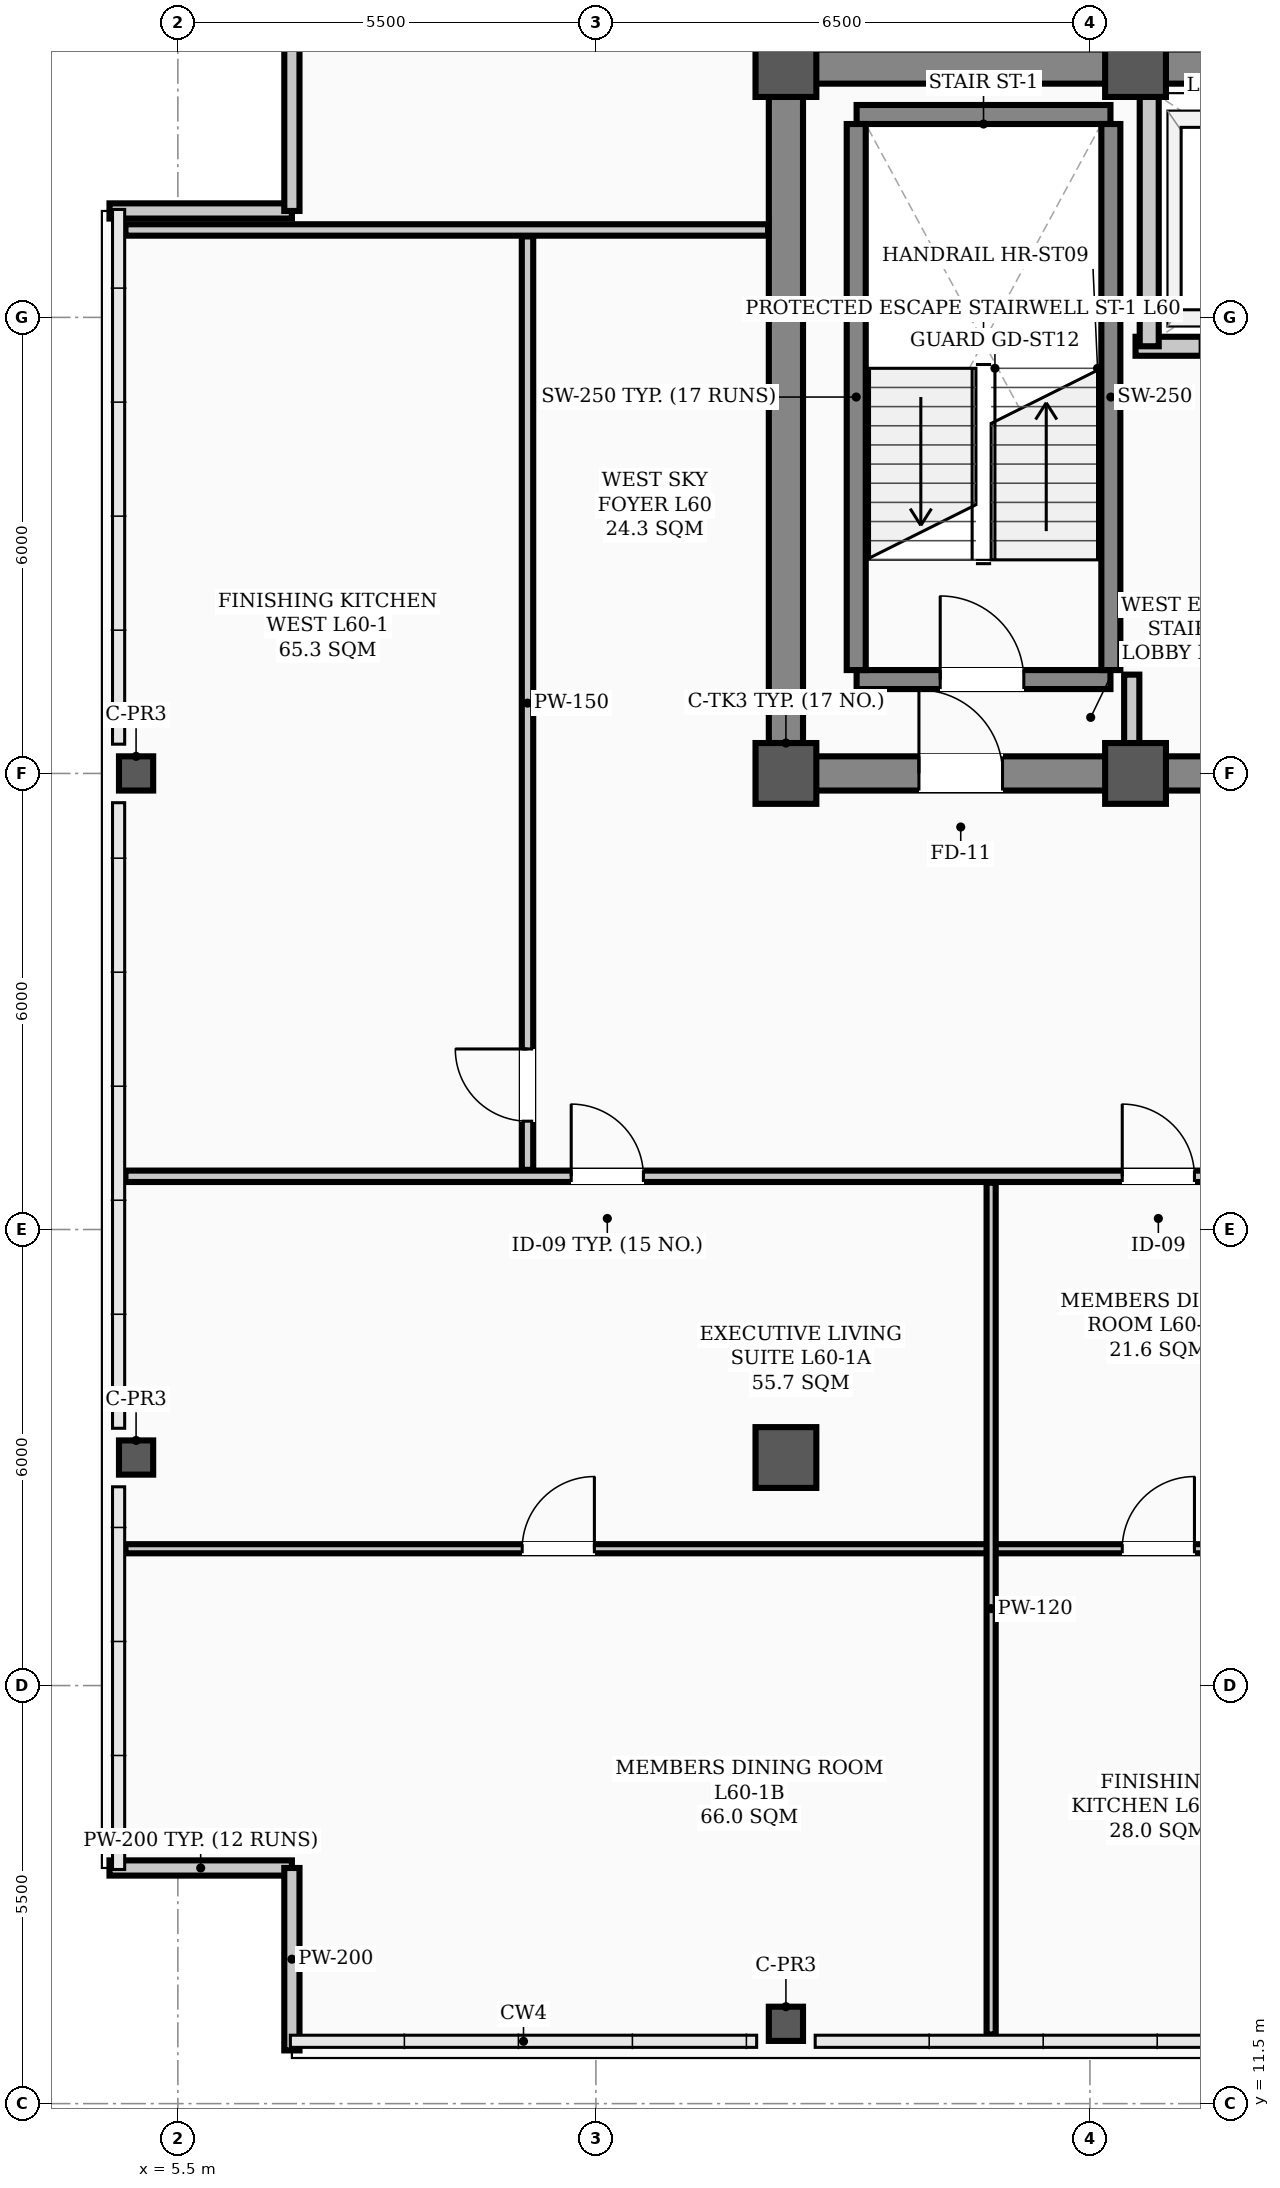
"""IFC4 building model, lengths in metres.
Left out: names, types, materials, properties, quantities, classifications, styles, units other than length and angle.
Written with IfcOpenShell. Run it as: python <this file> out.ifc"""

import sys

from ifc_helpers import new_model, si_unit, direction, frame, frame_2d, origin, origin_2d, place, context, subcontext, project, spatial, rectangle, hollow_rectangle, extrude, element, fill, save


model = new_model("IFC4")
c1 = context("Model", 3, precision=1e-05, world=origin(), true_north=direction((0.0, 1.0)))
c2 = subcontext(c1, "Body", "Model", "MODEL_VIEW")
j1 = project(units=[si_unit("LENGTHUNIT", "METRE"), si_unit("PLANEANGLEUNIT", "RADIAN")], contexts=[c1])
p1 = place(None, origin())
s1 = spatial("IfcSite", under=j1, at=p1, CompositionType="ELEMENT")
p2 = place(p1, origin())
s2 = spatial("IfcBuilding", under=s1, at=p2, CompositionType="ELEMENT")
p3 = place(p2, frame((0.0, 0.0, 242.3)))
s3 = spatial("IfcBuildingStorey", under=s2, at=p3, CompositionType="ELEMENT", Elevation=242.3)
for number, where, z_axis, x_axis in (
    (1, (13.5, 29.0, 0.0), (0.0, 0.0, 1.0), (1.0, 0.0, 0.0)),
    (2, (13.5, 38.3, 0.0), (0.0, 0.0, 1.0), (1.0, 0.0, 0.0)),
    (3, (18.1, 29.0, 0.0), (0.0, 0.0, 1.0), (1.0, 0.0, 0.0)),
    (4, (18.1, 38.3, 0.0), (0.0, 0.0, 1.0), (1.0, 0.0, 0.0)),
    (5, (13.5, 20.0, 0.0), (0.0, 0.0, 1.0), (1.0, 0.0, 0.0)),
):
    element("IfcColumn", number, at=place(p3, frame(where, z_axis=z_axis, x_axis=x_axis)), inside=s3, PredefinedType="COLUMN", context=c2, shape_type="SweptSolid", body=[
        extrude(hollow_rectangle(XDim=0.8, YDim=0.8, WallThickness=0.032, InnerFilletRadius=0.016, OuterFilletRadius=0.048, at=origin_2d()), origin(), (0.0, 0.0, 1.0), 3.9),
    ])
for number, where, z_axis, x_axis in (
    (6, (4.95, 20.0, 0.0), (0.0, 0.0, 1.0), (1.0, 0.0, 0.0)),
    (7, (4.95, 29.0, 0.0), (0.0, 0.0, 1.0), (1.0, 0.0, 0.0)),
    (8, (13.5, 12.55, 0.0), (0.0, 0.0, 1.0), (1.0, 0.0, 0.0)),
):
    element("IfcColumn", number, at=place(p3, frame(where, z_axis=z_axis, x_axis=x_axis)), inside=s3, PredefinedType="COLUMN", context=c2, shape_type="SweptSolid", body=[
        extrude(hollow_rectangle(XDim=0.45, YDim=0.45, WallThickness=0.022, InnerFilletRadius=0.022, OuterFilletRadius=0.044, at=origin_2d()), origin(), (0.0, 0.0, 1.0), 3.9),
    ])
p4 = place(p3, frame((4.6, 14.6, 0.0), z_axis=(0.0, 0.0, 1.0), x_axis=(1.0, 0.0, 0.0)))
e9 = element("IfcWall", 9, at=p4, inside=s3, PredefinedType="PARAPET", context=c2, shape_type="SweptSolid", body=[
    extrude(rectangle(XDim=2.4, YDim=0.2, at=frame_2d((1.2, 0.0))), origin(), (0.0, 0.0, 1.0), 1.2),
])
p5 = place(p3, frame((7.0, 14.6, 0.0), z_axis=(0.0, 0.0, 1.0), x_axis=(0.0, -1.0, 0.0)))
e10 = element("IfcWall", 10, at=p5, inside=s3, PredefinedType="PARAPET", context=c2, shape_type="SweptSolid", body=[
    extrude(rectangle(XDim=2.4, YDim=0.2, at=frame_2d((1.2, 0.0))), origin(), (0.0, 0.0, 1.0), 1.2),
])
p6 = place(p3, frame((4.6, 36.4, 0.0), z_axis=(0.0, 0.0, 1.0), x_axis=(1.0, 0.0, 0.0)))
e11 = element("IfcWall", 11, at=p6, inside=s3, PredefinedType="PARAPET", context=c2, shape_type="SweptSolid", body=[
    extrude(rectangle(XDim=2.4, YDim=0.2, at=frame_2d((1.2, 0.0))), origin(), (0.0, 0.0, 1.0), 1.2),
])
p7 = place(p3, frame((7.0, 36.4, 0.0), z_axis=(0.0, 0.0, 1.0), x_axis=(0.0, 1.0, 0.0)))
e12 = element("IfcWall", 12, at=p7, inside=s3, PredefinedType="PARAPET", context=c2, shape_type="SweptSolid", body=[
    extrude(rectangle(XDim=2.4, YDim=0.2, at=frame_2d((1.2, 0.0))), origin(), (0.0, 0.0, 1.0), 1.2),
])
p8 = place(p3, frame((13.5, 29.0, 0.0), z_axis=(0.0, 0.0, 1.0), x_axis=(1.0, 0.0, 0.0)))
e13 = element("IfcWall", 13, at=p8, inside=s3, PredefinedType="SHEAR", context=c2, shape_type="SweptSolid", body=[
    extrude(rectangle(XDim=30.5, YDim=0.45, at=frame_2d((15.25, 0.0))), origin(), (0.0, 0.0, 1.0), 3.72),
])
p9 = place(p8, frame((1.75, 0.0, 0.0)))
e14 = element("IfcOpeningElement", 14, at=p9, cuts=e13, PredefinedType="OPENING", context=c2, shape_type="SweptSolid", body=[
    extrude(rectangle(XDim=1.1, YDim=2.08, at=frame_2d((0.55, 1.04))), frame((0.0, 0.235, 0.0), z_axis=(0.0, -1.0, 0.0), x_axis=(1.0, 0.0, 0.0)), (0.0, 0.0, 1.0), 0.47),
])
p10 = place(p8, frame((26.7, 0.0, 0.0)))
e15 = element("IfcOpeningElement", 15, at=p10, cuts=e13, PredefinedType="OPENING", context=c2, shape_type="SweptSolid", body=[
    extrude(rectangle(XDim=1.1, YDim=2.08, at=frame_2d((0.55, 1.04))), frame((0.0, 0.235, 0.0), z_axis=(0.0, -1.0, 0.0), x_axis=(1.0, 0.0, 0.0)), (0.0, 0.0, 1.0), 0.47),
])
p11 = place(p8, frame((6.8, 0.0, 0.0)))
e16 = element("IfcOpeningElement", 16, at=p11, cuts=e13, PredefinedType="OPENING", context=c2, shape_type="SweptSolid", body=[
    extrude(rectangle(XDim=1.1, YDim=2.08, at=frame_2d((0.55, 1.04))), frame((0.0, 0.235, 0.0), z_axis=(0.0, -1.0, 0.0), x_axis=(1.0, 0.0, 0.0)), (0.0, 0.0, 1.0), 0.47),
])
p12 = place(p8, frame((13.2, 0.0, 0.0)))
e17 = element("IfcOpeningElement", 17, at=p12, cuts=e13, PredefinedType="OPENING", context=c2, shape_type="SweptSolid", body=[
    extrude(rectangle(XDim=1.6, YDim=2.08, at=frame_2d((0.8, 1.04))), frame((0.0, 0.235, 0.0), z_axis=(0.0, -1.0, 0.0), x_axis=(1.0, 0.0, 0.0)), (0.0, 0.0, 1.0), 0.47),
])
p13 = place(p8, frame((19.53, 0.0, 0.0)))
e18 = element("IfcOpeningElement", 18, at=p13, cuts=e13, PredefinedType="OPENING", context=c2, shape_type="SweptSolid", body=[
    extrude(rectangle(XDim=0.9, YDim=2.08, at=frame_2d((0.45, 1.04))), frame((0.0, 0.235, 0.0), z_axis=(0.0, -1.0, 0.0), x_axis=(1.0, 0.0, 0.0)), (0.0, 0.0, 1.0), 0.47),
])
p14 = place(p8, frame((21.57, 0.0, 0.0)))
e19 = element("IfcOpeningElement", 19, at=p14, cuts=e13, PredefinedType="OPENING", context=c2, shape_type="SweptSolid", body=[
    extrude(rectangle(XDim=0.9, YDim=2.08, at=frame_2d((0.45, 1.04))), frame((0.0, 0.235, 0.0), z_axis=(0.0, -1.0, 0.0), x_axis=(1.0, 0.0, 0.0)), (0.0, 0.0, 1.0), 0.47),
])
p15 = place(p3, frame((13.5, 38.3, 0.0), z_axis=(0.0, 0.0, 1.0), x_axis=(1.0, 0.0, 0.0)))
e20 = element("IfcWall", 20, at=p15, inside=s3, PredefinedType="SHEAR", context=c2, shape_type="SweptSolid", body=[
    extrude(rectangle(XDim=30.5, YDim=0.45, at=frame_2d((15.25, 0.0))), origin(), (0.0, 0.0, 1.0), 3.72),
])
p16 = place(p3, frame((13.5, 29.35, 0.0), z_axis=(0.0, 0.0, 1.0), x_axis=(0.0, 1.0, 0.0)))
e21 = element("IfcWall", 21, at=p16, inside=s3, PredefinedType="SHEAR", context=c2, shape_type="SweptSolid", body=[
    extrude(rectangle(XDim=8.6, YDim=0.45, at=frame_2d((4.3, 0.0))), origin(), (0.0, 0.0, 1.0), 3.72),
])
p17 = place(p3, frame((14.43, 30.235, 0.0), z_axis=(0.0, 0.0, 1.0), x_axis=(1.0, 0.0, 0.0)))
e22 = element("IfcWall", 22, at=p17, inside=s3, PredefinedType="STANDARD", context=c2, shape_type="SweptSolid", body=[
    extrude(rectangle(XDim=3.34, YDim=0.25, at=frame_2d((1.67, 0.0))), origin(), (0.0, 0.0, 1.0), 3.72),
])
p18 = place(p17, frame((1.1, 0.0, 0.0)))
e23 = element("IfcOpeningElement", 23, at=p18, cuts=e22, PredefinedType="OPENING", context=c2, shape_type="SweptSolid", body=[
    extrude(rectangle(XDim=1.1, YDim=2.08, at=frame_2d((0.55, 1.04))), frame((0.0, 0.135, 0.0), z_axis=(0.0, -1.0, 0.0), x_axis=(1.0, 0.0, 0.0)), (0.0, 0.0, 1.0), 0.27),
])
p19 = place(p3, frame((14.43, 37.669, 0.0), z_axis=(0.0, 0.0, 1.0), x_axis=(1.0, 0.0, 0.0)))
e24 = element("IfcWall", 24, at=p19, inside=s3, PredefinedType="STANDARD", context=c2, shape_type="SweptSolid", body=[
    extrude(rectangle(XDim=3.34, YDim=0.25, at=frame_2d((1.67, 0.0))), origin(), (0.0, 0.0, 1.0), 3.72),
])
for number, where, z_axis, x_axis in (
    (25, (14.425, 30.36, 0.0), (0.0, 0.0, 1.0), (0.0, 1.0, 0.0)),
    (26, (17.775, 30.36, 0.0), (0.0, 0.0, 1.0), (0.0, 1.0, 0.0)),
):
    element("IfcWall", number, at=place(p3, frame(where, z_axis=z_axis, x_axis=x_axis)), inside=s3, PredefinedType="STANDARD", context=c2, shape_type="SweptSolid", body=[
        extrude(rectangle(XDim=7.184, YDim=0.25, at=frame_2d((3.592, 0.0))), origin(), (0.0, 0.0, 1.0), 3.72),
    ])
p20 = place(p3, frame((18.1, 34.62, 0.0), z_axis=(0.0, 0.0, 1.0), x_axis=(1.0, 0.0, 0.0)))
e27 = element("IfcWall", 27, at=p20, inside=s3, PredefinedType="STANDARD", context=c2, shape_type="SweptSolid", body=[
    extrude(rectangle(XDim=5.35, YDim=0.25, at=frame_2d((2.675, 0.0))), origin(), (0.0, 0.0, 1.0), 3.72),
])
p21 = place(p20, frame((0.85, 0.0, 0.0)))
e28 = element("IfcOpeningElement", 28, at=p21, cuts=e27, PredefinedType="OPENING", context=c2, shape_type="SweptSolid", body=[
    extrude(rectangle(XDim=1.1, YDim=2.08, at=frame_2d((0.55, 1.04))), frame((0.0, 0.135, 0.0), z_axis=(0.0, -1.0, 0.0), x_axis=(1.0, 0.0, 0.0)), (0.0, 0.0, 1.0), 0.27),
])
p22 = place(p20, frame((3.45, 0.0, 0.0)))
e29 = element("IfcOpeningElement", 29, at=p22, cuts=e27, PredefinedType="OPENING", context=c2, shape_type="SweptSolid", body=[
    extrude(rectangle(XDim=1.1, YDim=2.08, at=frame_2d((0.55, 1.04))), frame((0.0, 0.135, 0.0), z_axis=(0.0, -1.0, 0.0), x_axis=(1.0, 0.0, 0.0)), (0.0, 0.0, 1.0), 0.27),
])
p23 = place(p3, frame((18.28, 34.62, 0.0), z_axis=(0.0, 0.0, 1.0), x_axis=(0.0, 1.0, 0.0)))
e30 = element("IfcWall", 30, at=p23, inside=s3, PredefinedType="STANDARD", context=c2, shape_type="SweptSolid", body=[
    extrude(rectangle(XDim=3.33, YDim=0.25, at=frame_2d((1.665, 0.0))), origin(), (0.0, 0.0, 1.0), 3.72),
])
p24 = place(p3, frame((4.81, 23.7, 0.0), z_axis=(0.0, 0.0, 1.0), x_axis=(1.0, 0.0, 0.0)))
e31 = element("IfcWall", 31, at=p24, inside=s3, PredefinedType="PARTITIONING", context=c2, shape_type="SweptSolid", body=[
    extrude(rectangle(XDim=40.88, YDim=0.15, at=frame_2d((20.44, 0.0))), origin(), (0.0, 0.0, 1.0), 3.2),
])
p25 = place(p24, frame((5.865, 0.0, 0.0)))
e32 = element("IfcOpeningElement", 32, at=p25, cuts=e31, PredefinedType="OPENING", context=c2, shape_type="SweptSolid", body=[
    extrude(rectangle(XDim=0.95, YDim=2.08, at=frame_2d((0.475, 1.04))), frame((0.0, 0.085, 0.0), z_axis=(0.0, -1.0, 0.0), x_axis=(1.0, 0.0, 0.0)), (0.0, 0.0, 1.0), 0.17),
])
p26 = place(p24, frame((13.115, 0.0, 0.0)))
e33 = element("IfcOpeningElement", 33, at=p26, cuts=e31, PredefinedType="OPENING", context=c2, shape_type="SweptSolid", body=[
    extrude(rectangle(XDim=0.95, YDim=2.08, at=frame_2d((0.475, 1.04))), frame((0.0, 0.085, 0.0), z_axis=(0.0, -1.0, 0.0), x_axis=(1.0, 0.0, 0.0)), (0.0, 0.0, 1.0), 0.17),
])
p27 = place(p24, frame((16.515, 0.0, 0.0)))
e34 = element("IfcOpeningElement", 34, at=p27, cuts=e31, PredefinedType="OPENING", context=c2, shape_type="SweptSolid", body=[
    extrude(rectangle(XDim=0.95, YDim=2.08, at=frame_2d((0.475, 1.04))), frame((0.0, 0.085, 0.0), z_axis=(0.0, -1.0, 0.0), x_axis=(1.0, 0.0, 0.0)), (0.0, 0.0, 1.0), 0.17),
])
p28 = place(p24, frame((22.915, 0.0, 0.0)))
e35 = element("IfcOpeningElement", 35, at=p28, cuts=e31, PredefinedType="OPENING", context=c2, shape_type="SweptSolid", body=[
    extrude(rectangle(XDim=0.95, YDim=2.08, at=frame_2d((0.475, 1.04))), frame((0.0, 0.085, 0.0), z_axis=(0.0, -1.0, 0.0), x_axis=(1.0, 0.0, 0.0)), (0.0, 0.0, 1.0), 0.17),
])
p29 = place(p24, frame((29.115, 0.0, 0.0)))
e36 = element("IfcOpeningElement", 36, at=p29, cuts=e31, PredefinedType="OPENING", context=c2, shape_type="SweptSolid", body=[
    extrude(rectangle(XDim=0.95, YDim=2.08, at=frame_2d((0.475, 1.04))), frame((0.0, 0.085, 0.0), z_axis=(0.0, -1.0, 0.0), x_axis=(1.0, 0.0, 0.0)), (0.0, 0.0, 1.0), 0.17),
])
p30 = place(p24, frame((34.215, 0.0, 0.0)))
e37 = element("IfcOpeningElement", 37, at=p30, cuts=e31, PredefinedType="OPENING", context=c2, shape_type="SweptSolid", body=[
    extrude(rectangle(XDim=0.95, YDim=2.08, at=frame_2d((0.475, 1.04))), frame((0.0, 0.085, 0.0), z_axis=(0.0, -1.0, 0.0), x_axis=(1.0, 0.0, 0.0)), (0.0, 0.0, 1.0), 0.17),
])
p31 = place(p24, frame((38.46, 0.0, 0.0)))
e38 = element("IfcOpeningElement", 38, at=p31, cuts=e31, PredefinedType="OPENING", context=c2, shape_type="SweptSolid", body=[
    extrude(rectangle(XDim=0.95, YDim=2.08, at=frame_2d((0.475, 1.04))), frame((0.0, 0.085, 0.0), z_axis=(0.0, -1.0, 0.0), x_axis=(1.0, 0.0, 0.0)), (0.0, 0.0, 1.0), 0.17),
])
p32 = place(p3, frame((4.81, 36.15, 0.0), z_axis=(0.0, 0.0, 1.0), x_axis=(1.0, 0.0, 0.0)))
e39 = element("IfcWall", 39, at=p32, inside=s3, PredefinedType="PARTITIONING", context=c2, shape_type="SweptSolid", body=[
    extrude(rectangle(XDim=8.455, YDim=0.15, at=frame_2d((4.228, 0.0))), origin(), (0.0, 0.0, 1.0), 3.2),
])
p33 = place(p3, frame((4.81, 18.8, 0.0), z_axis=(0.0, 0.0, 1.0), x_axis=(1.0, 0.0, 0.0)))
e40 = element("IfcWall", 40, at=p33, inside=s3, PredefinedType="PARTITIONING", context=c2, shape_type="SweptSolid", body=[
    extrude(rectangle(XDim=11.39, YDim=0.12, at=frame_2d((5.695, 0.0))), origin(), (0.0, 0.0, 1.0), 3.2),
])
p34 = place(p33, frame((5.22, 0.0, 0.0)))
e41 = element("IfcOpeningElement", 41, at=p34, cuts=e40, PredefinedType="OPENING", context=c2, shape_type="SweptSolid", body=[
    extrude(rectangle(XDim=0.95, YDim=2.08, at=frame_2d((0.475, 1.04))), frame((0.0, 0.07, 0.0), z_axis=(0.0, -1.0, 0.0), x_axis=(1.0, 0.0, 0.0)), (0.0, 0.0, 1.0), 0.14),
])
p35 = place(p3, frame((16.2, 18.8, 0.0), z_axis=(0.0, 0.0, 1.0), x_axis=(1.0, 0.0, 0.0)))
e42 = element("IfcWall", 42, at=p35, inside=s3, PredefinedType="PARTITIONING", context=c2, shape_type="SweptSolid", body=[
    extrude(rectangle(XDim=4.4, YDim=0.12, at=frame_2d((2.2, 0.0))), origin(), (0.0, 0.0, 1.0), 3.35),
])
p36 = place(p35, frame((1.725, 0.0, 0.0)))
e43 = element("IfcOpeningElement", 43, at=p36, cuts=e42, PredefinedType="OPENING", context=c2, shape_type="SweptSolid", body=[
    extrude(rectangle(XDim=0.95, YDim=2.08, at=frame_2d((0.475, 1.04))), frame((0.0, 0.07, 0.0), z_axis=(0.0, -1.0, 0.0), x_axis=(1.0, 0.0, 0.0)), (0.0, 0.0, 1.0), 0.14),
])
p37 = place(p3, frame((18.05, 29.235, 0.0), z_axis=(0.0, 0.0, 1.0), x_axis=(0.0, 1.0, 0.0)))
e44 = element("IfcWall", 44, at=p37, inside=s3, PredefinedType="STANDARD", context=c2, shape_type="SweptSolid", body=[
    extrude(rectangle(XDim=1.065, YDim=0.2, at=frame_2d((0.532, 0.0))), origin(), (0.0, 0.0, 1.0), 3.35),
])
p38 = place(p3, frame((10.1, 23.785, 0.0), z_axis=(0.0, 0.0, 1.0), x_axis=(0.0, 1.0, 0.0)))
e45 = element("IfcWall", 45, at=p38, inside=s3, PredefinedType="PARTITIONING", context=c2, shape_type="SweptSolid", body=[
    extrude(rectangle(XDim=12.28, YDim=0.15, at=frame_2d((6.14, 0.0))), origin(), (0.0, 0.0, 1.0), 3.1),
])
p39 = place(p38, frame((0.64, 0.0, 0.0)))
e46 = element("IfcOpeningElement", 46, at=p39, cuts=e45, PredefinedType="OPENING", context=c2, shape_type="SweptSolid", body=[
    extrude(rectangle(XDim=0.95, YDim=2.08, at=frame_2d((0.475, 1.04))), frame((0.0, 0.085, 0.0), z_axis=(0.0, -1.0, 0.0), x_axis=(1.0, 0.0, 0.0)), (0.0, 0.0, 1.0), 0.17),
])
p40 = place(p3, frame((16.2, 12.41, 0.0), z_axis=(0.0, 0.0, 1.0), x_axis=(0.0, 1.0, 0.0)))
e47 = element("IfcWall", 47, at=p40, inside=s3, PredefinedType="PARTITIONING", context=c2, shape_type="SweptSolid", body=[
    extrude(rectangle(XDim=11.205, YDim=0.12, at=frame_2d((5.603, 0.0))), origin(), (0.0, 0.0, 1.0), 3.1),
])
p41 = place(p18, origin())
e48 = element("IfcDoor", 48, at=p41, inside=s3, OperationType="SINGLE_SWING_LEFT", PredefinedType="DOOR", context=c2, shape_type="SweptSolid", body=[
    extrude(rectangle(XDim=1.1, YDim=2.08, at=frame_2d((0.55, 1.04))), frame((0.0, 0.025, 0.0), z_axis=(0.0, -1.0, 0.0), x_axis=(1.0, 0.0, 0.0)), (0.0, 0.0, 1.0), 0.05),
])
fill(e23, e48)
p42 = place(p9, origin())
e49 = element("IfcDoor", 49, at=p42, inside=s3, OperationType="SINGLE_SWING_LEFT", PredefinedType="DOOR", context=c2, shape_type="SweptSolid", body=[
    extrude(rectangle(XDim=1.1, YDim=2.08, at=frame_2d((0.55, 1.04))), frame((0.0, 0.025, 0.0), z_axis=(0.0, -1.0, 0.0), x_axis=(1.0, 0.0, 0.0)), (0.0, 0.0, 1.0), 0.05),
])
fill(e14, e49)
p43 = place(p34, origin())
e50 = element("IfcDoor", 50, at=p43, inside=s3, OperationType="SINGLE_SWING_RIGHT", PredefinedType="DOOR", context=c2, shape_type="SweptSolid", body=[
    extrude(rectangle(XDim=0.95, YDim=2.08, at=frame_2d((0.475, 1.04))), frame((0.0, 0.025, 0.0), z_axis=(0.0, -1.0, 0.0), x_axis=(1.0, 0.0, 0.0)), (0.0, 0.0, 1.0), 0.05),
])
fill(e41, e50)
p44 = place(p25, origin())
e51 = element("IfcDoor", 51, at=p44, inside=s3, OperationType="SINGLE_SWING_LEFT", PredefinedType="DOOR", context=c2, shape_type="SweptSolid", body=[
    extrude(rectangle(XDim=0.95, YDim=2.08, at=frame_2d((0.475, 1.04))), frame((0.0, 0.025, 0.0), z_axis=(0.0, -1.0, 0.0), x_axis=(1.0, 0.0, 0.0)), (0.0, 0.0, 1.0), 0.05),
])
fill(e32, e51)
p45 = place(p36, origin())
e52 = element("IfcDoor", 52, at=p45, inside=s3, OperationType="SINGLE_SWING_RIGHT", PredefinedType="DOOR", context=c2, shape_type="SweptSolid", body=[
    extrude(rectangle(XDim=0.95, YDim=2.08, at=frame_2d((0.475, 1.04))), frame((0.0, 0.025, 0.0), z_axis=(0.0, -1.0, 0.0), x_axis=(1.0, 0.0, 0.0)), (0.0, 0.0, 1.0), 0.05),
])
fill(e43, e52)
p46 = place(p26, origin())
e53 = element("IfcDoor", 53, at=p46, inside=s3, OperationType="SINGLE_SWING_LEFT", PredefinedType="DOOR", context=c2, shape_type="SweptSolid", body=[
    extrude(rectangle(XDim=0.95, YDim=2.08, at=frame_2d((0.475, 1.04))), frame((0.0, 0.025, 0.0), z_axis=(0.0, -1.0, 0.0), x_axis=(1.0, 0.0, 0.0)), (0.0, 0.0, 1.0), 0.05),
])
fill(e33, e53)
p47 = place(p39, origin())
e54 = element("IfcDoor", 54, at=p47, inside=s3, OperationType="SINGLE_SWING_RIGHT", PredefinedType="DOOR", context=c2, shape_type="SweptSolid", body=[
    extrude(rectangle(XDim=0.95, YDim=2.08, at=frame_2d((0.475, 1.04))), frame((0.0, 0.025, 0.0), z_axis=(0.0, -1.0, 0.0), x_axis=(1.0, 0.0, 0.0)), (0.0, 0.0, 1.0), 0.05),
])
fill(e46, e54)
save(model, sys.argv[1])
